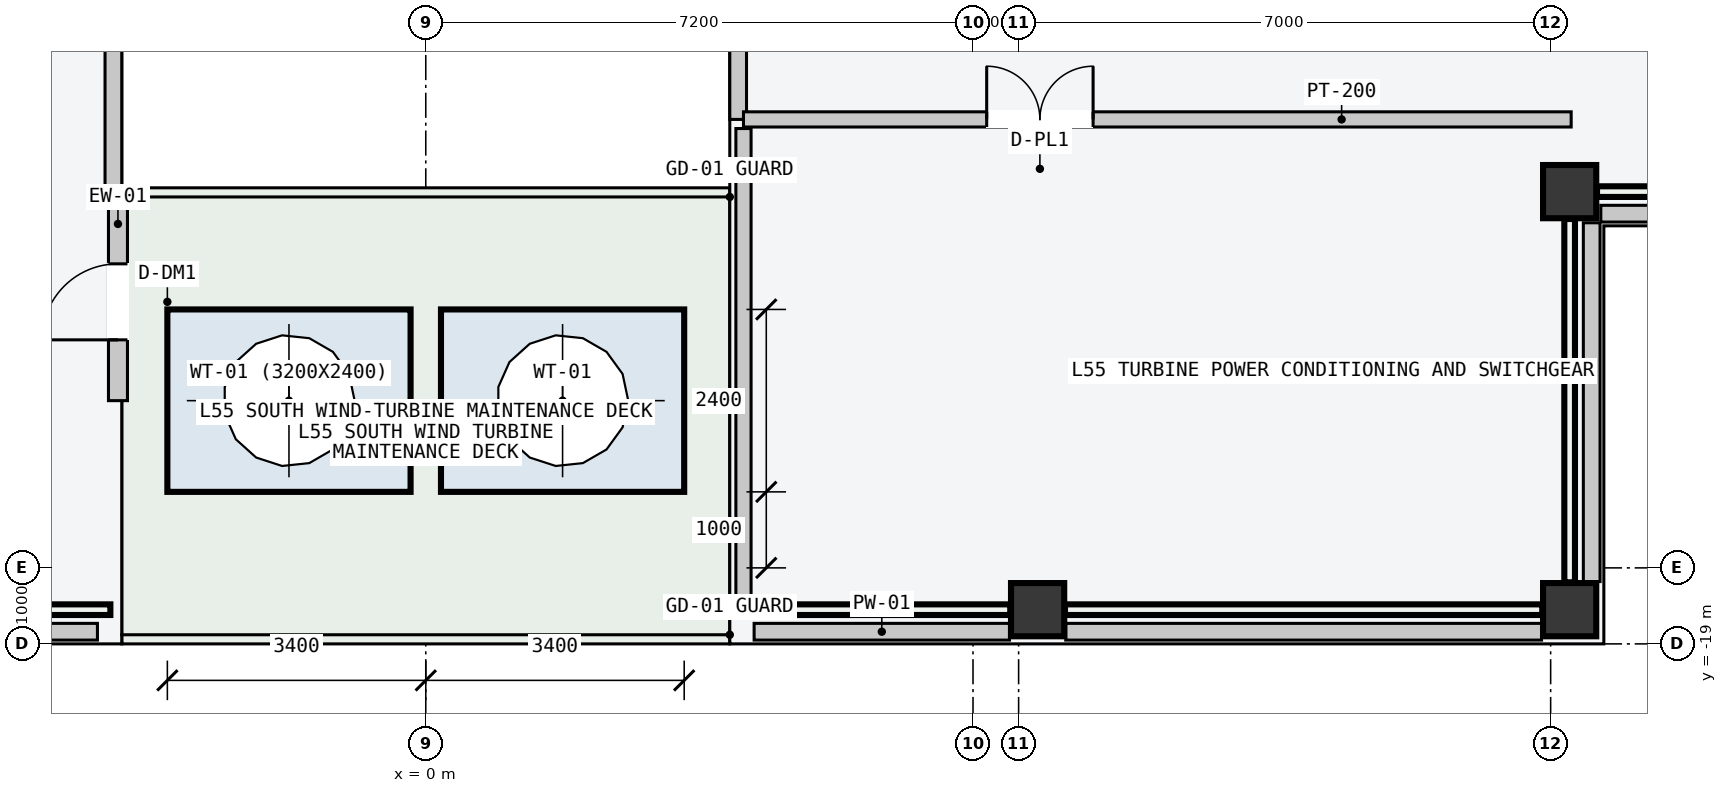
"""IFC4 building model, lengths in metres.
Left out: names, types, materials, properties, quantities, classifications, styles, units other than length and angle.
Written with IfcOpenShell. Run it as: python <this file> out.ifc"""

import sys

from ifc_helpers import new_model, si_unit, direction, frame, frame_2d, origin, origin_2d, place, context, subcontext, project, spatial, rectangle, hollow_rectangle, extrude, element, fill, save


model = new_model("IFC4")
c1 = context("Model", 3, precision=1e-05, world=origin(), true_north=direction((0.0, 1.0)))
c2 = subcontext(c1, "Body", "Model", "MODEL_VIEW")
j1 = project(units=[si_unit("LENGTHUNIT", "METRE"), si_unit("PLANEANGLEUNIT", "RADIAN")], contexts=[c1])
p1 = place(None, origin())
s1 = spatial("IfcSite", under=j1, at=p1, CompositionType="ELEMENT")
p2 = place(p1, origin())
s2 = spatial("IfcBuilding", under=s1, at=p2, CompositionType="ELEMENT")
p3 = place(p2, frame((0.0, 0.0, 209.1)))
s3 = spatial("IfcBuildingStorey", under=s2, at=p3, CompositionType="ELEMENT", Elevation=209.1)
for number, where, z_axis, x_axis in (
    (1, (8.05, -18.55, 0.0), (0.0, 0.0, 1.0), (1.0, 0.0, 0.0)),
    (2, (15.05, -18.55, 0.0), (0.0, 0.0, 1.0), (1.0, 0.0, 0.0)),
    (3, (15.05, -13.05, 0.0), (0.0, 0.0, 1.0), (1.0, 0.0, 0.0)),
):
    element("IfcColumn", number, at=place(p3, frame(where, z_axis=z_axis, x_axis=x_axis)), inside=s3, PredefinedType="COLUMN", context=c2, shape_type="SweptSolid", body=[
        extrude(hollow_rectangle(XDim=0.7, YDim=0.7, WallThickness=0.03, at=origin_2d()), origin(), (0.0, 0.0, 1.0), 4.8),
    ])
for number, where, z_axis, x_axis in (
    (4, (-7.68, -18.84, 0.0), (0.0, 0.0, 1.0), (1.0, 0.0, 0.0)),
    (5, (4.32, -18.84, 0.0), (0.0, 0.0, 1.0), (1.0, 0.0, 0.0)),
):
    element("IfcWall", number, at=place(p3, frame(where, z_axis=z_axis, x_axis=x_axis)), inside=s3, PredefinedType="PARAPET", context=c2, shape_type="SweptSolid", body=[
        extrude(rectangle(XDim=3.36, YDim=0.22, at=frame_2d((1.68, 0.0))), origin(), (0.0, 0.0, 1.0), 1.2),
    ])
p4 = place(p3, frame((8.42, -18.84, 0.0), z_axis=(0.0, 0.0, 1.0), x_axis=(1.0, 0.0, 0.0)))
e6 = element("IfcWall", 6, at=p4, inside=s3, PredefinedType="PARAPET", context=c2, shape_type="SweptSolid", body=[
    extrude(rectangle(XDim=6.26, YDim=0.22, at=frame_2d((3.13, 0.0))), origin(), (0.0, 0.0, 1.0), 1.2),
])
for number, where, z_axis, x_axis in (
    (7, (15.34, -18.18, 0.0), (0.0, 0.0, 1.0), (0.0, 1.0, 0.0)),
    (8, (15.46, -13.34, 0.0), (0.0, 0.0, 1.0), (1.0, 0.0, 0.0)),
):
    element("IfcWall", number, at=place(p3, frame(where, z_axis=z_axis, x_axis=x_axis)), inside=s3, PredefinedType="PARAPET", context=c2, shape_type="SweptSolid", body=[
        extrude(rectangle(XDim=4.72, YDim=0.22, at=frame_2d((2.36, 0.0))), origin(), (0.0, 0.0, 1.0), 1.2),
    ])
p5 = place(p3, frame((-4.11, -13.18, 0.0), z_axis=(0.0, 0.0, 1.0), x_axis=(0.0, 1.0, 0.0)))
e9 = element("IfcWall", 9, at=p5, inside=s3, PredefinedType="PARAPET", context=c2, shape_type="SweptSolid", body=[
    extrude(rectangle(XDim=26.36, YDim=0.22, at=frame_2d((13.18, 0.0))), origin(), (0.0, 0.0, 1.0), 1.2),
])
p6 = place(p3, frame((4.11, -12.1, 0.0), z_axis=(0.0, 0.0, 1.0), x_axis=(0.0, 1.0, 0.0)))
e10 = element("IfcWall", 10, at=p6, inside=s3, PredefinedType="PARAPET", context=c2, shape_type="SweptSolid", body=[
    extrude(rectangle(XDim=24.2, YDim=0.22, at=frame_2d((12.1, 0.0))), origin(), (0.0, 0.0, 1.0), 1.2),
])
p7 = place(p3, frame((-4.05, -15.8, 0.0), z_axis=(0.0, 0.0, 1.0), x_axis=(0.0, 1.0, 0.0)))
e11 = element("IfcWall", 11, at=p7, inside=s3, PredefinedType="STANDARD", context=c2, shape_type="SweptSolid", body=[
    extrude(rectangle(XDim=2.6, YDim=0.25, at=frame_2d((1.3, 0.0))), origin(), (0.0, 0.0, 1.0), 4.6),
])
p8 = place(p7, frame((0.8, 0.0, 0.0)))
e12 = element("IfcOpeningElement", 12, at=p8, cuts=e11, PredefinedType="OPENING", context=c2, shape_type="SweptSolid", body=[
    extrude(rectangle(XDim=1.0, YDim=2.15, at=frame_2d((0.5, 1.075))), frame((0.0, 0.135, 0.0), z_axis=(0.0, -1.0, 0.0), x_axis=(1.0, 0.0, 0.0)), (0.0, 0.0, 1.0), 0.27),
])
p9 = place(p3, frame((4.18, -12.1, 0.0), z_axis=(0.0, 0.0, 1.0), x_axis=(1.0, 0.0, 0.0)))
e13 = element("IfcWall", 13, at=p9, inside=s3, PredefinedType="PARTITIONING", context=c2, shape_type="SweptSolid", body=[
    extrude(rectangle(XDim=10.89, YDim=0.2, at=frame_2d((5.445, 0.0))), origin(), (0.0, 0.0, 1.0), 4.6),
])
p10 = place(p9, frame((3.2, 0.0, 0.0)))
e14 = element("IfcOpeningElement", 14, at=p10, cuts=e13, PredefinedType="OPENING", context=c2, shape_type="SweptSolid", body=[
    extrude(rectangle(XDim=1.4, YDim=2.25, at=frame_2d((0.7, 1.125))), frame((0.0, 0.11, 0.0), z_axis=(0.0, -1.0, 0.0), x_axis=(1.0, 0.0, 0.0)), (0.0, 0.0, 1.0), 0.22),
])
p11 = place(p3, frame((4.18, -18.57, 0.0), z_axis=(0.0, 0.0, 1.0), x_axis=(0.0, 1.0, 0.0)))
e15 = element("IfcWall", 15, at=p11, inside=s3, PredefinedType="PARTITIONING", context=c2, shape_type="SweptSolid", body=[
    extrude(rectangle(XDim=6.35, YDim=0.2, at=frame_2d((3.175, 0.0))), origin(), (0.0, 0.0, 1.0), 4.6),
])
p12 = place(p8, origin())
e16 = element("IfcDoor", 16, at=p12, inside=s3, OperationType="SINGLE_SWING_LEFT", PredefinedType="DOOR", context=c2, shape_type="SweptSolid", body=[
    extrude(rectangle(XDim=1.0, YDim=2.15, at=frame_2d((0.5, 1.075))), frame((0.0, 0.025, 0.0), z_axis=(0.0, -1.0, 0.0), x_axis=(1.0, 0.0, 0.0)), (0.0, 0.0, 1.0), 0.05),
])
fill(e12, e16)
p13 = place(p10, origin())
e17 = element("IfcDoor", 17, at=p13, inside=s3, OperationType="DOUBLE_DOOR_SINGLE_SWING", PredefinedType="DOOR", context=c2, shape_type="SweptSolid", body=[
    extrude(rectangle(XDim=1.4, YDim=2.25, at=frame_2d((0.7, 1.125))), frame((0.0, 0.025, 0.0), z_axis=(0.0, -1.0, 0.0), x_axis=(1.0, 0.0, 0.0)), (0.0, 0.0, 1.0), 0.05),
])
fill(e14, e17)
save(model, sys.argv[1])
